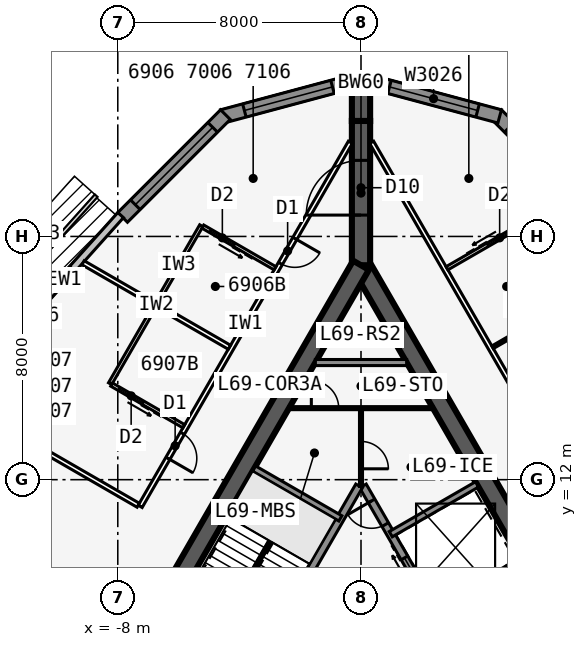
"""IFC4 building model, lengths in metres.
Left out: names, types, materials, properties, quantities, classifications, styles, units other than length and angle.
Written with IfcOpenShell. Run it as: python <this file> out.ifc"""

import sys

from ifc_helpers import new_model, si_unit, direction, frame, frame_2d, origin, place, context, subcontext, project, spatial, polyline, rectangle, outline, extrude, element, fill, save


model = new_model("IFC4")
c1 = context("Model", 3, precision=1e-05, world=origin(), true_north=direction((0.0, 1.0)))
c2 = subcontext(c1, "Body", "Model", "MODEL_VIEW")
j1 = project(units=[si_unit("LENGTHUNIT", "METRE"), si_unit("PLANEANGLEUNIT", "RADIAN")], contexts=[c1])
p1 = place(None, origin())
s1 = spatial("IfcSite", under=j1, at=p1, CompositionType="ELEMENT")
p2 = place(p1, origin())
s2 = spatial("IfcBuilding", under=s1, at=p2, CompositionType="ELEMENT")
p3 = place(p2, frame((0.0, 0.0, 260.9)))
s3 = spatial("IfcBuildingStorey", under=s2, at=p3, CompositionType="ELEMENT", Elevation=260.9)
p4 = place(p3, frame((16.5, -9.526, 0.0), z_axis=(0.0, 0.0, 1.0), x_axis=(-0.499999749417, 0.866025548458, 0.0)))
e1 = element("IfcWall", 1, at=p4, inside=s3, PredefinedType="SHEAR", context=c2, shape_type="SweptSolid", body=[
    extrude(rectangle(XDim=33.0, YDim=0.6, at=frame_2d((16.5, 0.0))), origin(), (0.0, 0.0, 1.0), 3.6),
])
p5 = place(p4, frame((14.15, 0.0, 0.0)))
e2 = element("IfcOpeningElement", 2, at=p5, cuts=e1, PredefinedType="OPENING", context=c2, shape_type="SweptSolid", body=[
    extrude(rectangle(XDim=1.8, YDim=2.13, at=frame_2d((0.9, 1.065))), frame((0.0, 0.31, 0.0), z_axis=(0.0, -1.0, 0.0), x_axis=(1.0, 0.0, 0.0)), (0.0, 0.0, 1.0), 0.62),
])
p6 = place(p4, frame((12.6, 0.0, 0.0)))
e3 = element("IfcOpeningElement", 3, at=p6, cuts=e1, PredefinedType="OPENING", context=c2, shape_type="SweptSolid", body=[
    extrude(rectangle(XDim=1.0, YDim=2.13, at=frame_2d((0.5, 1.065))), frame((0.0, 0.31, 0.0), z_axis=(0.0, -1.0, 0.0), x_axis=(1.0, 0.0, 0.0)), (0.0, 0.0, 1.0), 0.62),
])
p7 = place(p3, frame((5.379, 2.586, 0.0), z_axis=(0.0, 0.0, 1.0), x_axis=(-0.500001375892, 0.866024609411, 0.0)))
e4 = element("IfcWall", 4, at=p7, inside=s3, PredefinedType="SOLIDWALL", context=c2, shape_type="SweptSolid", body=[
    extrude(rectangle(XDim=10.633, YDim=0.25, at=frame_2d((5.316, 0.0))), origin(), (0.0, 0.0, 1.0), 3.435),
])
p8 = place(p7, frame((9.164, 0.0, 0.0)))
e5 = element("IfcOpeningElement", 5, at=p8, cuts=e4, PredefinedType="OPENING", context=c2, shape_type="SweptSolid", body=[
    extrude(rectangle(XDim=0.9, YDim=2.13, at=frame_2d((0.45, 1.065))), frame((0.0, 0.135, 0.0), z_axis=(0.0, -1.0, 0.0), x_axis=(1.0, 0.0, 0.0)), (0.0, 0.0, 1.0), 0.27),
])
p9 = place(p7, frame((1.0, 0.0, 0.0)))
e6 = element("IfcOpeningElement", 6, at=p9, cuts=e4, PredefinedType="OPENING", context=c2, shape_type="SweptSolid", body=[
    extrude(rectangle(XDim=1.1, YDim=2.13, at=frame_2d((0.55, 1.065))), frame((0.0, 0.135, 0.0), z_axis=(0.0, -1.0, 0.0), x_axis=(1.0, 0.0, 0.0)), (0.0, 0.0, 1.0), 0.27),
])
p10 = place(p7, frame((3.9, 0.0, 0.0)))
e7 = element("IfcOpeningElement", 7, at=p10, cuts=e4, PredefinedType="OPENING", context=c2, shape_type="SweptSolid", body=[
    extrude(rectangle(XDim=1.1, YDim=2.13, at=frame_2d((0.55, 1.065))), frame((0.0, 0.135, 0.0), z_axis=(0.0, -1.0, 0.0), x_axis=(1.0, 0.0, 0.0)), (0.0, 0.0, 1.0), 0.27),
])
p11 = place(p7, frame((6.8, 0.0, 0.0)))
e8 = element("IfcOpeningElement", 8, at=p11, cuts=e4, PredefinedType="OPENING", context=c2, shape_type="SweptSolid", body=[
    extrude(rectangle(XDim=1.1, YDim=2.13, at=frame_2d((0.55, 1.065))), frame((0.0, 0.135, 0.0), z_axis=(0.0, -1.0, 0.0), x_axis=(1.0, 0.0, 0.0)), (0.0, 0.0, 1.0), 0.27),
])
for number, where, z_axis, x_axis in (
    (9, (2.429, 7.696, 0.0), (0.0, 0.0, 1.0), (0.866, 0.5, 0.0)),
    (10, (0.979, 10.207, 0.0), (0.0, 0.0, 1.0), (0.866, 0.5, 0.0)),
):
    element("IfcWall", number, at=place(p3, frame(where, z_axis=z_axis, x_axis=x_axis)), inside=s3, PredefinedType="SOLIDWALL", context=c2, shape_type="SweptSolid", body=[
        extrude(rectangle(XDim=3.275, YDim=0.2, at=frame_2d((1.637, 0.0))), origin(), (0.0, 0.0, 1.0), 3.435),
    ])
p12 = place(p3, frame((0.0, 19.052, 0.0), z_axis=(0.0, 0.0, 1.0), x_axis=(-0.499999749417, -0.866025548458, 0.0)))
e11 = element("IfcWall", 11, at=p12, inside=s3, PredefinedType="SHEAR", context=c2, shape_type="SweptSolid", body=[
    extrude(rectangle(XDim=33.0, YDim=0.6, at=frame_2d((16.5, 0.0))), origin(), (0.0, 0.0, 1.0), 3.6),
])
p13 = place(p12, frame((14.15, 0.0, 0.0)))
e12 = element("IfcOpeningElement", 12, at=p13, cuts=e11, PredefinedType="OPENING", context=c2, shape_type="SweptSolid", body=[
    extrude(rectangle(XDim=1.8, YDim=2.13, at=frame_2d((0.9, 1.065))), frame((0.0, 0.31, 0.0), z_axis=(0.0, -1.0, 0.0), x_axis=(1.0, 0.0, 0.0)), (0.0, 0.0, 1.0), 0.62),
])
p14 = place(p12, frame((12.6, 0.0, 0.0)))
e13 = element("IfcOpeningElement", 13, at=p14, cuts=e11, PredefinedType="OPENING", context=c2, shape_type="SweptSolid", body=[
    extrude(rectangle(XDim=1.0, YDim=2.13, at=frame_2d((0.5, 1.065))), frame((0.0, 0.31, 0.0), z_axis=(0.0, -1.0, 0.0), x_axis=(1.0, 0.0, 0.0)), (0.0, 0.0, 1.0), 0.62),
])
p15 = place(p3, frame((-0.062, 11.794, 0.0), z_axis=(0.0, 0.0, 1.0), x_axis=(-0.500006680225, -0.86602154692, 0.0)))
e14 = element("IfcWall", 14, at=p15, inside=s3, PredefinedType="SOLIDWALL", context=c2, shape_type="SweptSolid", body=[
    extrude(rectangle(XDim=7.733, YDim=0.25, at=frame_2d((3.866, 0.0))), origin(), (0.0, 0.0, 1.0), 3.435),
])
p16 = place(p3, frame((-0.679, 10.727, 0.0), z_axis=(0.0, 0.0, 1.0), x_axis=(-0.866027924134, 0.499995634601, 0.0)))
e15 = element("IfcWall", 15, at=p16, inside=s3, PredefinedType="SOLIDWALL", context=c2, shape_type="SweptSolid", body=[
    extrude(rectangle(XDim=3.275, YDim=0.2, at=frame_2d((1.637, 0.0))), origin(), (0.0, 0.0, 1.0), 3.435),
])
p17 = place(p3, frame((0.0, 19.052, 0.0), z_axis=(0.0, 0.0, 1.0), x_axis=(0.0, 1.0, 0.0)))
e16 = element("IfcWall", 16, at=p17, inside=s3, PredefinedType="SHEAR", context=c2, shape_type="SweptSolid", body=[
    extrude(rectangle(XDim=4.746, YDim=0.6, at=frame_2d((2.373, 0.0))), origin(), (0.0, 0.0, 1.0), 3.6),
])
p18 = place(p17, frame((1.65, 0.0, 0.0)))
e17 = element("IfcOpeningElement", 17, at=p18, cuts=e16, PredefinedType="OPENING", context=c2, shape_type="SweptSolid", body=[
    extrude(rectangle(XDim=1.8, YDim=2.13, at=frame_2d((0.9, 1.065))), frame((0.0, 0.31, 0.0), z_axis=(0.0, -1.0, 0.0), x_axis=(1.0, 0.0, 0.0)), (0.0, 0.0, 1.0), 0.62),
])
p19 = place(p3, frame((0.0, 23.799, 0.0), z_axis=(0.0, 0.0, 1.0), x_axis=(0.0, 1.0, 0.0)))
e18 = element("IfcWall", 18, at=p19, inside=s3, PredefinedType="SHEAR", context=c2, shape_type="SweptSolid", body=[
    extrude(rectangle(XDim=1.155, YDim=0.6, at=frame_2d((0.577, 0.0))), origin(), (0.0, 0.0, 1.0), 3.6),
])
p20 = place(p3, frame((7.841, 20.625, 0.0), z_axis=(0.0, 0.0, 1.0), x_axis=(-0.707106781187, 0.707106781187, 0.0)))
e19 = element("IfcWall", 19, at=p20, inside=s3, PredefinedType="SOLIDWALL", context=c2, shape_type="SweptSolid", body=[
    extrude(rectangle(XDim=4.781, YDim=0.45, at=frame_2d((2.391, 0.0))), origin(), (0.0, 0.0, 1.0), 3.435),
])
p21 = place(p20, frame((0.591, 0.0, 0.45)))
e20 = element("IfcOpeningElement", 20, at=p21, cuts=e19, PredefinedType="OPENING", context=c2, shape_type="SweptSolid", body=[
    extrude(rectangle(XDim=3.6, YDim=2.6, at=frame_2d((1.8, 1.3))), frame((0.0, 0.235, 0.0), z_axis=(0.0, -1.0, 0.0), x_axis=(1.0, 0.0, 0.0)), (0.0, 0.0, 1.0), 0.47),
])
p22 = place(p3, frame((4.561, 23.948, 0.0), z_axis=(0.0, 0.0, 1.0), x_axis=(-0.965926628191, 0.258816052347, 0.0)))
e21 = element("IfcWall", 21, at=p22, inside=s3, PredefinedType="SOLIDWALL", context=c2, shape_type="SweptSolid", body=[
    extrude(outline(polyline([(4.781, 0.225), (4.722, 0.225), (4.375, 0.132), (4.351, 0.225), (0.0, 0.225), (0.0, -0.225), (4.781, -0.225), (4.781, 0.225)])), origin(), (0.0, 0.0, 1.0), 3.435),
])
p23 = place(p22, frame((0.75, 0.0, 0.45)))
e22 = element("IfcOpeningElement", 22, at=p23, cuts=e21, PredefinedType="OPENING", context=c2, shape_type="SweptSolid", body=[
    extrude(rectangle(XDim=3.0, YDim=2.6, at=frame_2d((1.5, 1.3))), frame((0.0, 0.235, 0.0), z_axis=(0.0, -1.0, 0.0), x_axis=(1.0, 0.0, 0.0)), (0.0, 0.0, 1.0), 0.47),
])
p24 = place(p3, frame((0.058, 25.186, 0.0), z_axis=(0.0, 0.0, 1.0), x_axis=(-0.965926628191, -0.258816052347, 0.0)))
e23 = element("IfcWall", 23, at=p24, inside=s3, PredefinedType="SOLIDWALL", context=c2, shape_type="SweptSolid", body=[
    extrude(outline(polyline([(4.781, 0.225), (0.431, 0.225), (0.406, 0.132), (0.059, 0.225), (0.0, 0.225), (0.0, -0.225), (4.781, -0.225), (4.781, 0.225)])), origin(), (0.0, 0.0, 1.0), 3.435),
])
p25 = place(p24, frame((1.031, 0.0, 0.45)))
e24 = element("IfcOpeningElement", 24, at=p25, cuts=e23, PredefinedType="OPENING", context=c2, shape_type="SweptSolid", body=[
    extrude(rectangle(XDim=3.0, YDim=2.6, at=frame_2d((1.5, 1.3))), frame((0.0, 0.235, 0.0), z_axis=(0.0, -1.0, 0.0), x_axis=(1.0, 0.0, 0.0)), (0.0, 0.0, 1.0), 0.47),
])
p26 = place(p3, frame((-4.46, 24.007, 0.0), z_axis=(0.0, 0.0, 1.0), x_axis=(-0.707106781187, -0.707106781187, 0.0)))
e25 = element("IfcWall", 25, at=p26, inside=s3, PredefinedType="SOLIDWALL", context=c2, shape_type="SweptSolid", body=[
    extrude(rectangle(XDim=4.781, YDim=0.45, at=frame_2d((2.391, 0.0))), origin(), (0.0, 0.0, 1.0), 3.435),
])
p27 = place(p26, frame((0.591, 0.0, 0.45)))
e26 = element("IfcOpeningElement", 26, at=p27, cuts=e25, PredefinedType="OPENING", context=c2, shape_type="SweptSolid", body=[
    extrude(rectangle(XDim=3.6, YDim=2.6, at=frame_2d((1.8, 1.3))), frame((0.0, 0.235, 0.0), z_axis=(0.0, -1.0, 0.0), x_axis=(1.0, 0.0, 0.0)), (0.0, 0.0, 1.0), 0.47),
])
p28 = place(p3, frame((-7.907, 20.701, 0.0), z_axis=(0.0, 0.0, 1.0), x_axis=(-0.667303550892, -0.744785855778, 0.0)))
e27 = element("IfcWall", 27, at=p28, inside=s3, PredefinedType="STANDARD", context=c2, shape_type="SweptSolid", body=[
    extrude(rectangle(XDim=7.153, YDim=0.25, at=frame_2d((3.576, 0.0))), origin(), (0.0, 0.0, 1.0), 3.435),
])
p29 = place(p28, frame((2.376, 0.0, 0.45)))
e28 = element("IfcOpeningElement", 28, at=p29, cuts=e27, PredefinedType="OPENING", context=c2, shape_type="SweptSolid", body=[
    extrude(rectangle(XDim=4.2, YDim=2.6, at=frame_2d((2.1, 1.3))), frame((0.0, 0.135, 0.0), z_axis=(0.0, -1.0, 0.0), x_axis=(1.0, 0.0, 0.0)), (0.0, 0.0, 1.0), 0.27),
])
p30 = place(p3, frame((20.177, -11.245, 0.0), z_axis=(0.0, 0.0, 1.0), x_axis=(-0.499998875317, 0.866026053119, 0.0)))
e29 = element("IfcWall", 29, at=p30, inside=s3, PredefinedType="PARTITIONING", context=c2, shape_type="SweptSolid", body=[
    extrude(rectangle(XDim=39.654, YDim=0.15, at=frame_2d((19.827, 0.0))), origin(), (0.0, 0.0, 1.0), 3.435),
])
p31 = place(p30, frame((10.352, 0.0, 0.0)))
e30 = element("IfcOpeningElement", 30, at=p31, cuts=e29, PredefinedType="OPENING", context=c2, shape_type="SweptSolid", body=[
    extrude(rectangle(XDim=0.95, YDim=2.13, at=frame_2d((0.475, 1.065))), frame((0.0, 0.085, 0.0), z_axis=(0.0, -1.0, 0.0), x_axis=(1.0, 0.0, 0.0)), (0.0, 0.0, 1.0), 0.17),
])
p32 = place(p3, frame((4.329, 16.355, 0.0), z_axis=(0.0, 0.0, 1.0), x_axis=(0.866029066823, 0.499993655377, 0.0)))
e31 = element("IfcWall", 31, at=p32, inside=s3, PredefinedType="PARTITIONING", context=c2, shape_type="SweptSolid", body=[
    extrude(rectangle(XDim=5.559, YDim=0.1, at=frame_2d((2.779, 0.0))), origin(), (0.0, 0.0, 1.0), 2.823),
])
p33 = place(p32, frame((3.25, 0.0, 0.0)))
e32 = element("IfcOpeningElement", 32, at=p33, cuts=e31, PredefinedType="OPENING", context=c2, shape_type="SweptSolid", body=[
    extrude(rectangle(XDim=0.9, YDim=2.13, at=frame_2d((0.45, 1.065))), frame((0.0, 0.06, 0.0), z_axis=(0.0, -1.0, 0.0), x_axis=(1.0, 0.0, 0.0)), (0.0, 0.0, 1.0), 0.12),
])
p34 = place(p3, frame((2.829, 18.954, 0.0), z_axis=(0.0, 0.0, 1.0), x_axis=(0.866035715982, 0.499982138324, 0.0)))
e33 = element("IfcWall", 33, at=p34, inside=s3, PredefinedType="PLUMBINGWALL", context=c2, shape_type="SweptSolid", body=[
    extrude(rectangle(XDim=2.74, YDim=0.12, at=frame_2d((1.37, 0.0))), origin(), (0.0, 0.0, 1.0), 3.435),
])
p35 = place(p34, frame((1.55, 0.0, 0.0)))
e34 = element("IfcOpeningElement", 34, at=p35, cuts=e33, PredefinedType="OPENING", context=c2, shape_type="SweptSolid", body=[
    extrude(rectangle(XDim=0.9, YDim=2.13, at=frame_2d((0.45, 1.065))), frame((0.0, 0.07, 0.0), z_axis=(0.0, -1.0, 0.0), x_axis=(1.0, 0.0, 0.0)), (0.0, 0.0, 1.0), 0.14),
])
p36 = place(p3, frame((-0.35, 23.096, 0.0), z_axis=(0.0, 0.0, 1.0), x_axis=(-0.499996044987, -0.8660276872, 0.0)))
e35 = element("IfcWall", 35, at=p36, inside=s3, PredefinedType="PARTITIONING", context=c2, shape_type="SweptSolid", body=[
    extrude(rectangle(XDim=13.827, YDim=0.15, at=frame_2d((6.913, 0.0))), origin(), (0.0, 0.0, 1.0), 3.435),
])
p37 = place(p36, frame((3.652, 0.0, 0.0)))
e36 = element("IfcOpeningElement", 36, at=p37, cuts=e35, PredefinedType="OPENING", context=c2, shape_type="SweptSolid", body=[
    extrude(rectangle(XDim=0.95, YDim=2.13, at=frame_2d((0.475, 1.065))), frame((0.0, 0.085, 0.0), z_axis=(0.0, -1.0, 0.0), x_axis=(1.0, 0.0, 0.0)), (0.0, 0.0, 1.0), 0.17),
])
p38 = place(p36, frame((11.052, 0.0, 0.0)))
e37 = element("IfcOpeningElement", 37, at=p38, cuts=e35, PredefinedType="OPENING", context=c2, shape_type="SweptSolid", body=[
    extrude(rectangle(XDim=0.95, YDim=2.13, at=frame_2d((0.475, 1.065))), frame((0.0, 0.085, 0.0), z_axis=(0.0, -1.0, 0.0), x_axis=(1.0, 0.0, 0.0)), (0.0, 0.0, 1.0), 0.17),
])
p39 = place(p3, frame((-4.329, 16.355, 0.0), z_axis=(0.0, 0.0, 1.0), x_axis=(-0.866029066823, 0.499993655377, 0.0)))
e38 = element("IfcWall", 38, at=p39, inside=s3, PredefinedType="PARTITIONING", context=c2, shape_type="SweptSolid", body=[
    extrude(rectangle(XDim=5.559, YDim=0.15, at=frame_2d((2.779, 0.0))), origin(), (0.0, 0.0, 1.0), 2.823),
])
p40 = place(p3, frame((-7.329, 11.159, 0.0), z_axis=(0.0, 0.0, 1.0), x_axis=(-0.866020720842, 0.500008111007, 0.0)))
e39 = element("IfcWall", 39, at=p40, inside=s3, PredefinedType="PARTITIONING", context=c2, shape_type="SweptSolid", body=[
    extrude(rectangle(XDim=6.732, YDim=0.15, at=frame_2d((3.366, 0.0))), origin(), (0.0, 0.0, 1.0), 3.435),
])
p41 = place(p3, frame((-5.253, 20.354, 0.0), z_axis=(0.0, 0.0, 1.0), x_axis=(-0.499990139034, -0.866031096941, 0.0)))
e40 = element("IfcWall", 40, at=p41, inside=s3, PredefinedType="PLUMBINGWALL", context=c2, shape_type="SweptSolid", body=[
    extrude(rectangle(XDim=3.0, YDim=0.12, at=frame_2d((1.5, 0.0))), origin(), (0.0, 0.0, 1.0), 3.435),
])
p42 = place(p3, frame((-2.829, 18.954, 0.0), z_axis=(0.0, 0.0, 1.0), x_axis=(-0.866035715982, 0.499982138324, 0.0)))
e41 = element("IfcWall", 41, at=p42, inside=s3, PredefinedType="PLUMBINGWALL", context=c2, shape_type="SweptSolid", body=[
    extrude(rectangle(XDim=2.74, YDim=0.12, at=frame_2d((1.37, 0.0))), origin(), (0.0, 0.0, 1.0), 3.435),
])
p43 = place(p42, frame((1.55, 0.0, 0.0)))
e42 = element("IfcOpeningElement", 42, at=p43, cuts=e41, PredefinedType="OPENING", context=c2, shape_type="SweptSolid", body=[
    extrude(rectangle(XDim=0.9, YDim=2.13, at=frame_2d((0.45, 1.065))), frame((0.0, 0.07, 0.0), z_axis=(0.0, -1.0, 0.0), x_axis=(1.0, 0.0, 0.0)), (0.0, 0.0, 1.0), 0.14),
])
p44 = place(p3, frame((-6.753, 17.755, 0.0), z_axis=(0.0, 0.0, 1.0), x_axis=(-0.50002537861, -0.866010750942, 0.0)))
e43 = element("IfcWall", 43, at=p44, inside=s3, PredefinedType="PLUMBINGWALL", context=c2, shape_type="SweptSolid", body=[
    extrude(rectangle(XDim=3.0, YDim=0.12, at=frame_2d((1.5, 0.0))), origin(), (0.0, 0.0, 1.0), 3.435),
])
p45 = place(p3, frame((-5.829, 13.757, 0.0), z_axis=(0.0, 0.0, 1.0), x_axis=(-0.865997131366, 0.500048966069, 0.0)))
e44 = element("IfcWall", 44, at=p45, inside=s3, PredefinedType="PLUMBINGWALL", context=c2, shape_type="SweptSolid", body=[
    extrude(rectangle(XDim=2.74, YDim=0.12, at=frame_2d((1.37, 0.0))), origin(), (0.0, 0.0, 1.0), 3.435),
])
p46 = place(p45, frame((1.55, 0.0, 0.0)))
e45 = element("IfcOpeningElement", 45, at=p46, cuts=e44, PredefinedType="OPENING", context=c2, shape_type="SweptSolid", body=[
    extrude(rectangle(XDim=0.9, YDim=2.13, at=frame_2d((0.45, 1.065))), frame((0.0, 0.07, 0.0), z_axis=(0.0, -1.0, 0.0), x_axis=(1.0, 0.0, 0.0)), (0.0, 0.0, 1.0), 0.14),
])
p47 = place(p3, frame((-1.501, 15.853, 0.0), z_axis=(0.0, 0.0, 1.0), x_axis=(1.0, 0.0, 0.0)))
e46 = element("IfcWall", 46, at=p47, inside=s3, PredefinedType="SOLIDWALL", context=c2, shape_type="SweptSolid", body=[
    extrude(rectangle(XDim=3.002, YDim=0.2, at=frame_2d((1.501, 0.0))), origin(), (0.0, 0.0, 1.0), 3.435),
])
p48 = place(p3, frame((-2.367, 14.353, 0.0), z_axis=(0.0, 0.0, 1.0), x_axis=(1.0, 0.0, 0.0)))
e47 = element("IfcWall", 47, at=p48, inside=s3, PredefinedType="PARTITIONING", context=c2, shape_type="SweptSolid", body=[
    extrude(rectangle(XDim=4.734, YDim=0.1, at=frame_2d((2.367, 0.0))), origin(), (0.0, 0.0, 1.0), 3.435),
])
p49 = place(p48, frame((0.734, 0.0, 0.0)))
e48 = element("IfcOpeningElement", 48, at=p49, cuts=e47, PredefinedType="OPENING", context=c2, shape_type="SweptSolid", body=[
    extrude(rectangle(XDim=0.9, YDim=2.13, at=frame_2d((0.45, 1.065))), frame((0.0, 0.06, 0.0), z_axis=(0.0, -1.0, 0.0), x_axis=(1.0, 0.0, 0.0)), (0.0, 0.0, 1.0), 0.12),
])
p50 = place(p3, frame((0.0, 14.353, 0.0), z_axis=(0.0, 0.0, 1.0), x_axis=(0.0, -1.0, 0.0)))
e49 = element("IfcWall", 49, at=p50, inside=s3, PredefinedType="PARTITIONING", context=c2, shape_type="SweptSolid", body=[
    extrude(rectangle(XDim=2.575, YDim=0.1, at=frame_2d((1.288, 0.0))), origin(), (0.0, 0.0, 1.0), 3.435),
])
p51 = place(p50, frame((1.095, 0.0, 0.0)))
e50 = element("IfcOpeningElement", 50, at=p51, cuts=e49, PredefinedType="OPENING", context=c2, shape_type="SweptSolid", body=[
    extrude(rectangle(XDim=0.9, YDim=2.13, at=frame_2d((0.45, 1.065))), frame((0.0, 0.06, 0.0), z_axis=(0.0, -1.0, 0.0), x_axis=(1.0, 0.0, 0.0)), (0.0, 0.0, 1.0), 0.12),
])
p52 = place(p3, frame((-2.988, 9.978, 0.0), z_axis=(0.0, 0.0, 1.0), x_axis=(-0.499992232847, -0.866029888106, 0.0)))
e51 = element("IfcWall", 51, at=p52, inside=s3, PredefinedType="SOLIDWALL", context=c2, shape_type="SweptSolid", body=[
    extrude(rectangle(XDim=2.794, YDim=0.1, at=frame_2d((1.397, 0.0))), origin(), (0.0, 0.0, 1.0), 3.6),
])
p53 = place(p23, origin())
e52 = element("IfcWindow", 52, at=p53, inside=s3, PartitioningType="SINGLE_PANEL", PredefinedType="WINDOW", context=c2, shape_type="SweptSolid", body=[
    extrude(rectangle(XDim=3.0, YDim=2.6, at=frame_2d((1.5, 1.3))), frame((0.0, 0.03, 0.0), z_axis=(0.0, -1.0, 0.0), x_axis=(1.0, 0.0, 0.0)), (0.0, 0.0, 1.0), 0.06),
])
fill(e22, e52)
p54 = place(p25, origin())
e53 = element("IfcWindow", 53, at=p54, inside=s3, PartitioningType="SINGLE_PANEL", PredefinedType="WINDOW", context=c2, shape_type="SweptSolid", body=[
    extrude(rectangle(XDim=3.0, YDim=2.6, at=frame_2d((1.5, 1.3))), frame((0.0, 0.03, 0.0), z_axis=(0.0, -1.0, 0.0), x_axis=(1.0, 0.0, 0.0)), (0.0, 0.0, 1.0), 0.06),
])
fill(e24, e53)
p55 = place(p27, origin())
e54 = element("IfcWindow", 54, at=p55, inside=s3, PartitioningType="SINGLE_PANEL", PredefinedType="WINDOW", context=c2, shape_type="SweptSolid", body=[
    extrude(rectangle(XDim=3.6, YDim=2.6, at=frame_2d((1.8, 1.3))), frame((0.0, 0.03, 0.0), z_axis=(0.0, -1.0, 0.0), x_axis=(1.0, 0.0, 0.0)), (0.0, 0.0, 1.0), 0.06),
])
fill(e26, e54)
p56 = place(p29, origin())
e55 = element("IfcWindow", 55, at=p56, inside=s3, PartitioningType="SINGLE_PANEL", PredefinedType="WINDOW", context=c2, shape_type="SweptSolid", body=[
    extrude(rectangle(XDim=4.2, YDim=2.6, at=frame_2d((2.1, 1.3))), frame((0.0, 0.03, 0.0), z_axis=(0.0, -1.0, 0.0), x_axis=(1.0, 0.0, 0.0)), (0.0, 0.0, 1.0), 0.06),
])
fill(e28, e55)
p57 = place(p35, origin())
e56 = element("IfcDoor", 56, at=p57, inside=s3, OperationType="SLIDING_TO_LEFT", PredefinedType="DOOR", context=c2, shape_type="SweptSolid", body=[
    extrude(rectangle(XDim=0.9, YDim=2.13, at=frame_2d((0.45, 1.065))), frame((0.0, 0.025, 0.0), z_axis=(0.0, -1.0, 0.0), x_axis=(1.0, 0.0, 0.0)), (0.0, 0.0, 1.0), 0.05),
])
fill(e34, e56)
p58 = place(p43, origin())
e57 = element("IfcDoor", 57, at=p58, inside=s3, OperationType="SLIDING_TO_LEFT", PredefinedType="DOOR", context=c2, shape_type="SweptSolid", body=[
    extrude(rectangle(XDim=0.9, YDim=2.13, at=frame_2d((0.45, 1.065))), frame((0.0, 0.025, 0.0), z_axis=(0.0, -1.0, 0.0), x_axis=(1.0, 0.0, 0.0)), (0.0, 0.0, 1.0), 0.05),
])
fill(e42, e57)
p59 = place(p37, origin())
e58 = element("IfcDoor", 58, at=p59, inside=s3, OperationType="SINGLE_SWING_LEFT", PredefinedType="DOOR", context=c2, shape_type="SweptSolid", body=[
    extrude(rectangle(XDim=0.95, YDim=2.13, at=frame_2d((0.475, 1.065))), frame((0.0, 0.025, 0.0), z_axis=(0.0, -1.0, 0.0), x_axis=(1.0, 0.0, 0.0)), (0.0, 0.0, 1.0), 0.05),
])
fill(e36, e58)
p60 = place(p46, origin())
e59 = element("IfcDoor", 59, at=p60, inside=s3, OperationType="SLIDING_TO_LEFT", PredefinedType="DOOR", context=c2, shape_type="SweptSolid", body=[
    extrude(rectangle(XDim=0.9, YDim=2.13, at=frame_2d((0.45, 1.065))), frame((0.0, 0.025, 0.0), z_axis=(0.0, -1.0, 0.0), x_axis=(1.0, 0.0, 0.0)), (0.0, 0.0, 1.0), 0.05),
])
fill(e45, e59)
p61 = place(p38, origin())
e60 = element("IfcDoor", 60, at=p61, inside=s3, OperationType="SINGLE_SWING_RIGHT", PredefinedType="DOOR", context=c2, shape_type="SweptSolid", body=[
    extrude(rectangle(XDim=0.95, YDim=2.13, at=frame_2d((0.475, 1.065))), frame((0.0, 0.025, 0.0), z_axis=(0.0, -1.0, 0.0), x_axis=(1.0, 0.0, 0.0)), (0.0, 0.0, 1.0), 0.05),
])
fill(e37, e60)
p62 = place(p18, origin())
e61 = element("IfcDoor", 61, at=p62, inside=s3, OperationType="DOUBLE_DOOR_DOUBLE_SWING", PredefinedType="DOOR", context=c2, shape_type="SweptSolid", body=[
    extrude(rectangle(XDim=1.8, YDim=2.13, at=frame_2d((0.9, 1.065))), frame((0.0, 0.025, 0.0), z_axis=(0.0, -1.0, 0.0), x_axis=(1.0, 0.0, 0.0)), (0.0, 0.0, 1.0), 0.05),
])
fill(e17, e61)
p63 = place(p49, origin())
e62 = element("IfcDoor", 62, at=p63, inside=s3, OperationType="SINGLE_SWING_LEFT", PredefinedType="DOOR", context=c2, shape_type="SweptSolid", body=[
    extrude(rectangle(XDim=0.9, YDim=2.13, at=frame_2d((0.45, 1.065))), frame((0.0, 0.025, 0.0), z_axis=(0.0, -1.0, 0.0), x_axis=(1.0, 0.0, 0.0)), (0.0, 0.0, 1.0), 0.05),
])
fill(e48, e62)
p64 = place(p8, origin())
e63 = element("IfcDoor", 63, at=p64, inside=s3, OperationType="SINGLE_SWING_RIGHT", PredefinedType="DOOR", context=c2, shape_type="SweptSolid", body=[
    extrude(rectangle(XDim=0.9, YDim=2.13, at=frame_2d((0.45, 1.065))), frame((0.0, 0.025, 0.0), z_axis=(0.0, -1.0, 0.0), x_axis=(1.0, 0.0, 0.0)), (0.0, 0.0, 1.0), 0.05),
])
fill(e5, e63)
p65 = place(p51, origin())
e64 = element("IfcDoor", 64, at=p65, inside=s3, OperationType="SINGLE_SWING_RIGHT", PredefinedType="DOOR", context=c2, shape_type="SweptSolid", body=[
    extrude(rectangle(XDim=0.9, YDim=2.13, at=frame_2d((0.45, 1.065))), frame((0.0, 0.025, 0.0), z_axis=(0.0, -1.0, 0.0), x_axis=(1.0, 0.0, 0.0)), (0.0, 0.0, 1.0), 0.05),
])
fill(e50, e64)
p66 = place(p11, origin())
e65 = element("IfcDoor", 65, at=p66, inside=s3, OperationType="DOUBLE_DOOR_SLIDING", PredefinedType="USERDEFINED", context=c2, shape_type="SweptSolid", body=[
    extrude(rectangle(XDim=1.1, YDim=2.13, at=frame_2d((0.55, 1.065))), frame((0.0, 0.025, 0.0), z_axis=(0.0, -1.0, 0.0), x_axis=(1.0, 0.0, 0.0)), (0.0, 0.0, 1.0), 0.05),
])
fill(e8, e65)
save(model, sys.argv[1])
